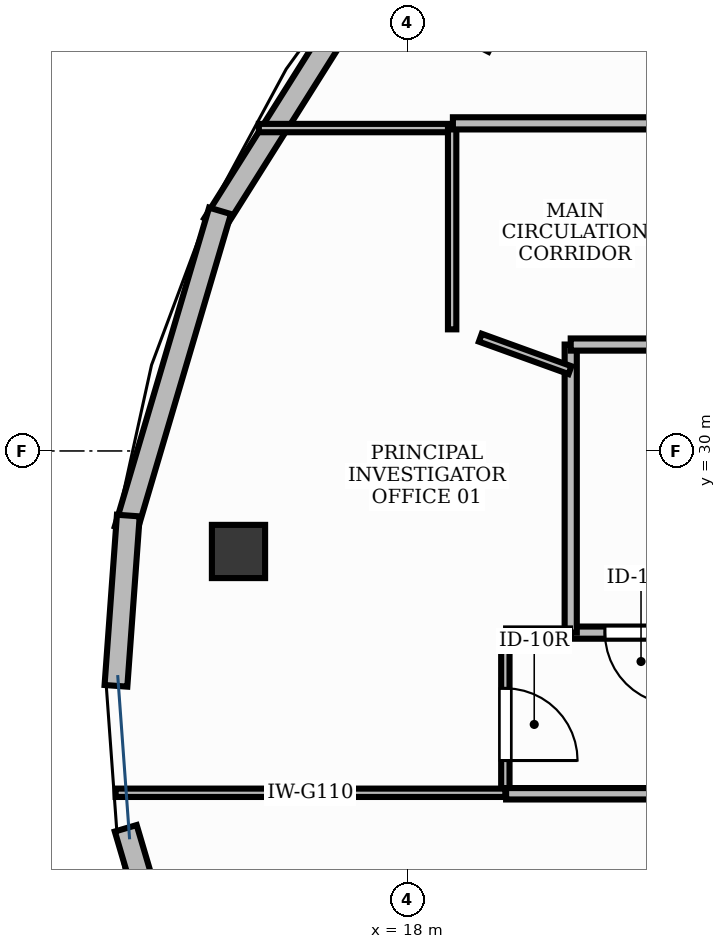
"""IFC4 building model, lengths in metres.
Left out: names, types, materials, properties, quantities, classifications, styles, units other than length and angle.
Written with IfcOpenShell. Run it as: python <this file> out.ifc"""

import sys

from ifc_helpers import new_model, si_unit, direction, frame, frame_2d, origin, origin_2d, place, context, subcontext, project, spatial, rectangle, extrude, element, fill, save


model = new_model("IFC4")
c1 = context("Model", 3, precision=1e-05, world=origin(), true_north=direction((0.0, 1.0)))
c2 = subcontext(c1, "Body", "Model", "MODEL_VIEW")
j1 = project(units=[si_unit("LENGTHUNIT", "METRE"), si_unit("PLANEANGLEUNIT", "RADIAN")], contexts=[c1])
p1 = place(None, origin())
s1 = spatial("IfcSite", under=j1, at=p1, CompositionType="ELEMENT")
p2 = place(p1, origin())
s2 = spatial("IfcBuilding", under=s1, at=p2, CompositionType="ELEMENT")
p3 = place(p2, frame((0.0, 0.0, 327.0)))
s3 = spatial("IfcBuildingStorey", under=s2, at=p3, CompositionType="ELEMENT", Elevation=327.0)
p4 = place(p3, frame((15.779, 28.677, -0.0), z_axis=(0.0, 0.0, 1.0), x_axis=(0.0, 1.0, 0.0)))
e1 = element("IfcColumn", 1, at=p4, inside=s3, PredefinedType="COLUMN", context=c2, shape_type="SweptSolid", body=[
    extrude(rectangle(XDim=0.7, YDim=0.7, at=origin_2d()), origin(), (0.0, 0.0, 1.0), 3.901),
])
p5 = place(p3, frame((17.863, 36.804, 0.0), z_axis=(0.0, 0.0, 1.0), x_axis=(-0.532667112983, -0.846324847057, 0.0)))
e2 = element("IfcWall", 2, at=p5, inside=s3, PredefinedType="STANDARD", context=c2, shape_type="SweptSolid", body=[
    extrude(rectangle(XDim=4.519, YDim=0.3, at=frame_2d((2.26, 0.0))), origin(), (0.0, 0.0, 1.0), 3.9),
])
p6 = place(p3, frame((15.537, 33.159, 0.0), z_axis=(0.0, 0.0, 1.0), x_axis=(-0.28362844186, -0.958934255811, 0.0)))
e3 = element("IfcWall", 3, at=p6, inside=s3, PredefinedType="STANDARD", context=c2, shape_type="SweptSolid", body=[
    extrude(rectangle(XDim=4.375, YDim=0.3, at=frame_2d((2.187, 0.0))), origin(), (0.0, 0.0, 1.0), 3.9),
])
p7 = place(p3, frame((14.33, 29.15, 0.0), z_axis=(0.0, 0.0, 1.0), x_axis=(-0.072398070171, -0.997375816548, 0.0)))
e4 = element("IfcWall", 4, at=p7, inside=s3, PredefinedType="STANDARD", context=c2, shape_type="SweptSolid", body=[
    extrude(rectangle(XDim=2.246, YDim=0.3, at=frame_2d((1.123, 0.0))), origin(), (0.0, 0.0, 1.0), 3.9),
])
p8 = place(p3, frame((14.296, 25.036, 0.0), z_axis=(0.0, 0.0, 1.0), x_axis=(0.28362844186, -0.958934255811, 0.0)))
e5 = element("IfcWall", 5, at=p8, inside=s3, PredefinedType="STANDARD", context=c2, shape_type="SweptSolid", body=[
    extrude(rectangle(XDim=4.375, YDim=0.3, at=frame_2d((2.187, 0.0))), origin(), (0.0, 0.0, 1.0), 3.9),
])
p9 = place(p3, frame((21.79, 27.61, 0.0), z_axis=(0.0, 0.0, 1.0), x_axis=(-1.0, 0.0, 0.0)))
e6 = element("IfcWall", 6, at=p9, inside=s3, PredefinedType="PARTITIONING", context=c2, shape_type="SweptSolid", body=[
    extrude(rectangle(XDim=1.64, YDim=0.16, at=frame_2d((0.82, 0.0))), origin(), (0.0, 0.0, 1.0), 2.22),
])
p10 = place(p9, frame((0.24, 0.0, 0.0)))
e7 = element("IfcOpeningElement", 7, at=p10, cuts=e6, PredefinedType="OPENING", context=c2, shape_type="SweptSolid", body=[
    extrude(rectangle(XDim=0.95, YDim=2.15, at=frame_2d((0.475, 1.075))), frame((0.0, 0.095, 0.0), z_axis=(0.0, -1.0, 0.0), x_axis=(1.0, 0.0, 0.0)), (0.0, 0.0, 1.0), 0.19),
])
p11 = place(p3, frame((19.29, 27.6, 0.0), z_axis=(0.0, 0.0, 1.0), x_axis=(0.0, -1.0, 0.0)))
e8 = element("IfcWall", 8, at=p11, inside=s3, PredefinedType="MOVABLE", context=c2, shape_type="SweptSolid", body=[
    extrude(rectangle(XDim=2.097, YDim=0.11, at=frame_2d((1.049, 0.0))), origin(), (0.0, 0.0, 1.0), 2.22),
])
p12 = place(p11, frame((0.723, 0.0, 0.0)))
e9 = element("IfcOpeningElement", 9, at=p12, cuts=e8, PredefinedType="OPENING", context=c2, shape_type="SweptSolid", body=[
    extrude(rectangle(XDim=0.95, YDim=2.15, at=frame_2d((0.475, 1.075))), frame((0.0, 0.07, 0.0), z_axis=(0.0, -1.0, 0.0), x_axis=(1.0, 0.0, 0.0)), (0.0, 0.0, 1.0), 0.14),
])
p13 = place(p3, frame((20.15, 27.61, 0.0), z_axis=(0.0, 0.0, 1.0), x_axis=(0.0, 1.0, 0.0)))
e10 = element("IfcWall", 10, at=p13, inside=s3, PredefinedType="PARTITIONING", context=c2, shape_type="SweptSolid", body=[
    extrude(rectangle(XDim=3.79, YDim=0.16, at=frame_2d((1.895, 0.0))), origin(), (0.0, 0.0, 1.0), 2.22),
])
p14 = place(p3, frame((20.15, 31.4, 0.0), z_axis=(0.0, 0.0, 1.0), x_axis=(1.0, 0.0, 0.0)))
e11 = element("IfcWall", 11, at=p14, inside=s3, PredefinedType="PARTITIONING", context=c2, shape_type="SweptSolid", body=[
    extrude(rectangle(XDim=1.64, YDim=0.16, at=frame_2d((0.82, 0.0))), origin(), (0.0, 0.0, 1.0), 2.22),
])
p15 = place(p3, frame((16.047, 34.248, 0.0), z_axis=(0.0, 0.0, 1.0), x_axis=(1.0, 0.0, 0.0)))
e12 = element("IfcWall", 12, at=p15, inside=s3, PredefinedType="MOVABLE", context=c2, shape_type="SweptSolid", body=[
    extrude(rectangle(XDim=2.543, YDim=0.11, at=frame_2d((1.271, 0.0))), origin(), (0.0, 0.0, 1.0), 2.22),
])
p16 = place(p3, frame((18.59, 34.248, 0.0), z_axis=(0.0, 0.0, 1.0), x_axis=(0.0, -1.0, 0.0)))
e13 = element("IfcWall", 13, at=p16, inside=s3, PredefinedType="MOVABLE", context=c2, shape_type="SweptSolid", body=[
    extrude(rectangle(XDim=2.648, YDim=0.11, at=frame_2d((1.324, 0.0))), origin(), (0.0, 0.0, 1.0), 2.22),
])
p17 = place(p3, frame((18.961, 31.49, 0.0), z_axis=(0.0, 0.0, 1.0), x_axis=(0.94035502025, -0.340194702915, 0.0)))
e14 = element("IfcWall", 14, at=p17, inside=s3, PredefinedType="MOVABLE", context=c2, shape_type="SweptSolid", body=[
    extrude(rectangle(XDim=1.254, YDim=0.11, at=frame_2d((0.627, 0.0))), origin(), (0.0, 0.0, 1.0), 2.22),
])
p18 = place(p3, frame((20.14, 27.61, 0.0), z_axis=(0.0, 0.0, 1.0), x_axis=(-1.0, 0.0, 0.0)))
e15 = element("IfcWall", 15, at=p18, inside=s3, PredefinedType="MOVABLE", context=c2, shape_type="SweptSolid", body=[
    extrude(rectangle(XDim=0.84, YDim=0.11, at=frame_2d((0.42, 0.0))), origin(), (0.0, 0.0, 1.0), 2.22),
])
p19 = place(p3, frame((19.29, 25.503, 0.0), z_axis=(0.0, 0.0, 1.0), x_axis=(-1.0, 0.0, 0.0)))
e16 = element("IfcWall", 16, at=p19, inside=s3, PredefinedType="MOVABLE", context=c2, shape_type="SweptSolid", body=[
    extrude(rectangle(XDim=5.127, YDim=0.11, at=frame_2d((2.564, 0.0))), origin(), (0.0, 0.0, 1.0), 2.22),
])
p20 = place(p3, frame((19.3, 25.49, 0.0), z_axis=(0.0, 0.0, 1.0), x_axis=(1.0, 0.0, 0.0)))
e17 = element("IfcWall", 17, at=p20, inside=s3, PredefinedType="PARTITIONING", context=c2, shape_type="SweptSolid", body=[
    extrude(rectangle(XDim=2.49, YDim=0.15, at=frame_2d((1.245, 0.0))), origin(), (0.0, 0.0, 1.0), 2.22),
])
p21 = place(p3, frame((21.79, 34.31, 0.0), z_axis=(0.0, 0.0, 1.0), x_axis=(-1.0, 0.0, 0.0)))
e18 = element("IfcWall", 18, at=p21, inside=s3, PredefinedType="PARTITIONING", context=c2, shape_type="SweptSolid", body=[
    extrude(rectangle(XDim=3.19, YDim=0.16, at=frame_2d((1.595, 0.0))), origin(), (0.0, 0.0, 1.0), 2.22),
])
p22 = place(p10, origin())
e19 = element("IfcDoor", 19, at=p22, inside=s3, OperationType="SINGLE_SWING_LEFT", PredefinedType="DOOR", context=c2, shape_type="SweptSolid", body=[
    extrude(rectangle(XDim=0.95, YDim=2.15, at=frame_2d((0.475, 1.075))), frame((0.0, 0.025, 0.0), z_axis=(0.0, -1.0, 0.0), x_axis=(1.0, 0.0, 0.0)), (0.0, 0.0, 1.0), 0.05),
])
fill(e7, e19)
p23 = place(p12, origin())
e20 = element("IfcDoor", 20, at=p23, inside=s3, OperationType="SINGLE_SWING_RIGHT", PredefinedType="DOOR", context=c2, shape_type="SweptSolid", body=[
    extrude(rectangle(XDim=0.95, YDim=2.15, at=frame_2d((0.475, 1.075))), frame((0.0, 0.025, 0.0), z_axis=(0.0, -1.0, 0.0), x_axis=(1.0, 0.0, 0.0)), (0.0, 0.0, 1.0), 0.05),
])
fill(e9, e20)
save(model, sys.argv[1])
